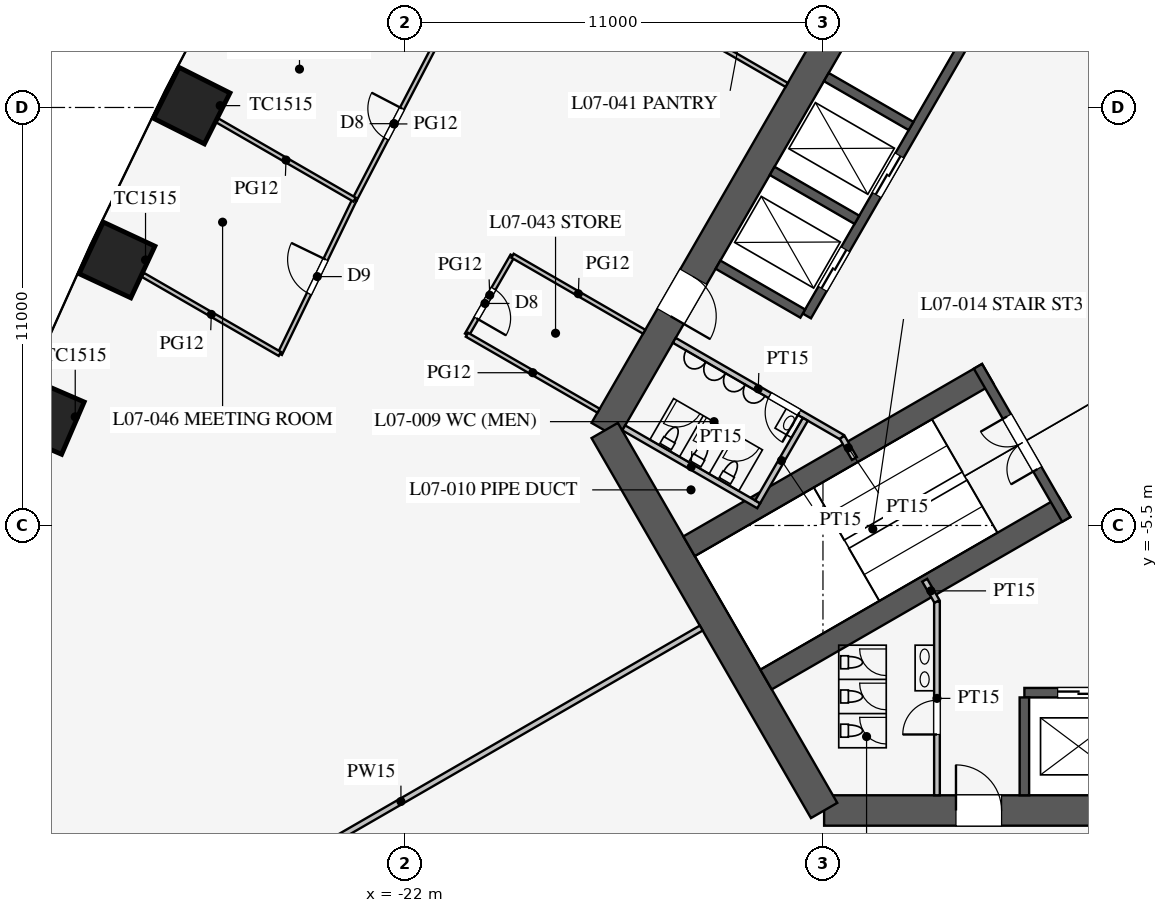
"""IFC4 building model, lengths in metres.
Left out: names, types, materials, properties, quantities, classifications, styles, units other than length and angle.
Written with IfcOpenShell. Run it as: python <this file> out.ifc"""

import sys

from ifc_helpers import new_model, si_unit, direction, frame, frame_2d, origin, origin_2d, place, context, subcontext, project, spatial, rectangle, extrude, element, fill, save


model = new_model("IFC4")
c1 = context("Model", 3, precision=1e-05, world=origin(), true_north=direction((0.0, 1.0)))
c2 = subcontext(c1, "Body", "Model", "MODEL_VIEW")
j1 = project(units=[si_unit("LENGTHUNIT", "METRE"), si_unit("PLANEANGLEUNIT", "RADIAN")], contexts=[c1])
p1 = place(None, origin())
s1 = spatial("IfcSite", under=j1, at=p1, CompositionType="ELEMENT")
p2 = place(p1, origin())
s2 = spatial("IfcBuilding", under=s1, at=p2, CompositionType="ELEMENT")
p3 = place(p2, frame((0.0, 0.0, 33.3)))
s3 = spatial("IfcBuildingStorey", under=s2, at=p3, CompositionType="ELEMENT", Elevation=33.3)
for number, where, z_axis, x_axis in (
    (1, (-27.611, 5.549, 0.0), (0.0, 0.0, 1.0), (-0.449, -0.894, 0.0)),
    (2, (-29.576, 1.487, 0.0), (0.0, 0.0, 1.0), (-0.423, -0.906, 0.0)),
    (3, (-31.426, -2.641, 0.0), (0.0, 0.0, 1.0), (-0.396, -0.918, 0.0)),
):
    element("IfcColumn", number, at=place(p3, frame(where, z_axis=z_axis, x_axis=x_axis)), inside=s3, PredefinedType="COLUMN", context=c2, shape_type="SweptSolid", body=[
        extrude(rectangle(XDim=1.5, YDim=1.5, at=origin_2d()), origin(), (0.0, 0.0, 1.0), 4.2),
    ])
p4 = place(p3, frame((-10.97, -13.0, 0.0), z_axis=(0.0, 0.0, 1.0), x_axis=(1.0, 0.0, 0.0)))
e4 = element("IfcWall", 4, at=p4, inside=s3, PredefinedType="SHEAR", context=c2, shape_type="SweptSolid", body=[
    extrude(rectangle(XDim=21.939, YDim=0.8, at=frame_2d((10.97, 0.0))), origin(), (0.0, 0.0, 1.0), 4.2),
])
p5 = place(p4, frame((17.27, 0.0, 0.0)))
e5 = element("IfcOpeningElement", 5, at=p5, cuts=e4, PredefinedType="OPENING", context=c2, shape_type="SweptSolid", body=[
    extrude(rectangle(XDim=1.2, YDim=2.1, at=frame_2d((0.6, 1.05))), frame((0.0, 0.41, 0.0), z_axis=(0.0, -1.0, 0.0), x_axis=(1.0, 0.0, 0.0)), (0.0, 0.0, 1.0), 0.82),
])
p6 = place(p4, frame((3.47, 0.0, 0.0)))
e6 = element("IfcOpeningElement", 6, at=p6, cuts=e4, PredefinedType="OPENING", context=c2, shape_type="SweptSolid", body=[
    extrude(rectangle(XDim=1.2, YDim=2.1, at=frame_2d((0.6, 1.05))), frame((0.0, 0.41, 0.0), z_axis=(0.0, -1.0, 0.0), x_axis=(1.0, 0.0, 0.0)), (0.0, 0.0, 1.0), 0.82),
])
p7 = place(p3, frame((-5.773, 16.0, 0.0), z_axis=(0.0, 0.0, 1.0), x_axis=(-0.500002442456, -0.866023993627, 0.0)))
e7 = element("IfcWall", 7, at=p7, inside=s3, PredefinedType="SHEAR", context=c2, shape_type="SweptSolid", body=[
    extrude(rectangle(XDim=21.939, YDim=0.8, at=frame_2d((10.97, 0.0))), origin(), (0.0, 0.0, 1.0), 4.2),
])
p8 = place(p7, frame((17.27, 0.0, 0.0)))
e8 = element("IfcOpeningElement", 8, at=p8, cuts=e7, PredefinedType="OPENING", context=c2, shape_type="SweptSolid", body=[
    extrude(rectangle(XDim=1.2, YDim=2.1, at=frame_2d((0.6, 1.05))), frame((0.0, 0.41, 0.0), z_axis=(0.0, -1.0, 0.0), x_axis=(1.0, 0.0, 0.0)), (0.0, 0.0, 1.0), 0.82),
])
p9 = place(p7, frame((3.47, 0.0, 0.0)))
e9 = element("IfcOpeningElement", 9, at=p9, cuts=e7, PredefinedType="OPENING", context=c2, shape_type="SweptSolid", body=[
    extrude(rectangle(XDim=1.2, YDim=2.1, at=frame_2d((0.6, 1.05))), frame((0.0, 0.41, 0.0), z_axis=(0.0, -1.0, 0.0), x_axis=(1.0, 0.0, 0.0)), (0.0, 0.0, 1.0), 0.82),
])
p10 = place(p3, frame((-16.743, -3.0, 0.0), z_axis=(0.0, 0.0, 1.0), x_axis=(0.499995765644, -0.866027848477, 0.0)))
e10 = element("IfcWall", 10, at=p10, inside=s3, PredefinedType="SHEAR", context=c2, shape_type="SweptSolid", body=[
    extrude(rectangle(XDim=11.547, YDim=0.8, at=frame_2d((5.773, 0.0))), origin(), (0.0, 0.0, 1.0), 4.2),
])
p11 = place(p3, frame((-5.7, -9.9, 0.0), z_axis=(0.0, 0.0, 1.0), x_axis=(1.0, 0.0, 0.0)))
e11 = element("IfcWall", 11, at=p11, inside=s3, PredefinedType="SHEAR", context=c2, shape_type="SweptSolid", body=[
    extrude(rectangle(XDim=11.4, YDim=0.25, at=frame_2d((5.7, 0.0))), origin(), (0.0, 0.0, 1.0), 4.2),
])
p12 = place(p11, frame((0.875, 0.0, 0.0)))
e12 = element("IfcOpeningElement", 12, at=p12, cuts=e11, PredefinedType="OPENING", context=c2, shape_type="SweptSolid", body=[
    extrude(rectangle(XDim=1.1, YDim=2.2, at=frame_2d((0.55, 1.1))), frame((0.0, 0.135, 0.0), z_axis=(0.0, -1.0, 0.0), x_axis=(1.0, 0.0, 0.0)), (0.0, 0.0, 1.0), 0.27),
])
p13 = place(p11, frame((3.725, 0.0, 0.0)))
e13 = element("IfcOpeningElement", 13, at=p13, cuts=e11, PredefinedType="OPENING", context=c2, shape_type="SweptSolid", body=[
    extrude(rectangle(XDim=1.1, YDim=2.2, at=frame_2d((0.55, 1.1))), frame((0.0, 0.135, 0.0), z_axis=(0.0, -1.0, 0.0), x_axis=(1.0, 0.0, 0.0)), (0.0, 0.0, 1.0), 0.27),
])
p14 = place(p11, frame((6.575, 0.0, 0.0)))
e14 = element("IfcOpeningElement", 14, at=p14, cuts=e11, PredefinedType="OPENING", context=c2, shape_type="SweptSolid", body=[
    extrude(rectangle(XDim=1.1, YDim=2.2, at=frame_2d((0.55, 1.1))), frame((0.0, 0.135, 0.0), z_axis=(0.0, -1.0, 0.0), x_axis=(1.0, 0.0, 0.0)), (0.0, 0.0, 1.0), 0.27),
])
p15 = place(p11, frame((9.425, 0.0, 0.0)))
e15 = element("IfcOpeningElement", 15, at=p15, cuts=e11, PredefinedType="OPENING", context=c2, shape_type="SweptSolid", body=[
    extrude(rectangle(XDim=1.1, YDim=2.2, at=frame_2d((0.55, 1.1))), frame((0.0, 0.135, 0.0), z_axis=(0.0, -1.0, 0.0), x_axis=(1.0, 0.0, 0.0)), (0.0, 0.0, 1.0), 0.27),
])
p16 = place(p3, frame((-5.7, -10.025, 0.0), z_axis=(0.0, 0.0, 1.0), x_axis=(0.0, -1.0, 0.0)))
e16 = element("IfcWall", 16, at=p16, inside=s3, PredefinedType="SHEAR", context=c2, shape_type="SweptSolid", body=[
    extrude(rectangle(XDim=2.575, YDim=0.25, at=frame_2d((1.288, 0.0))), origin(), (0.0, 0.0, 1.0), 4.2),
])
p17 = place(p3, frame((-5.724, 9.886, 0.0), z_axis=(0.0, 0.0, 1.0), x_axis=(-0.500001763848, -0.866024385424, 0.0)))
e17 = element("IfcWall", 17, at=p17, inside=s3, PredefinedType="SHEAR", context=c2, shape_type="SweptSolid", body=[
    extrude(rectangle(XDim=11.4, YDim=0.25, at=frame_2d((5.7, 0.0))), origin(), (0.0, 0.0, 1.0), 4.2),
])
p18 = place(p17, frame((6.525, 0.0, 0.0)))
e18 = element("IfcOpeningElement", 18, at=p18, cuts=e17, PredefinedType="OPENING", context=c2, shape_type="SweptSolid", body=[
    extrude(rectangle(XDim=1.2, YDim=2.2, at=frame_2d((0.6, 1.1))), frame((0.0, 0.135, 0.0), z_axis=(0.0, -1.0, 0.0), x_axis=(1.0, 0.0, 0.0)), (0.0, 0.0, 1.0), 0.27),
])
p19 = place(p17, frame((9.375, 0.0, 0.0)))
e19 = element("IfcOpeningElement", 19, at=p19, cuts=e17, PredefinedType="OPENING", context=c2, shape_type="SweptSolid", body=[
    extrude(rectangle(XDim=1.2, YDim=2.2, at=frame_2d((0.6, 1.1))), frame((0.0, 0.135, 0.0), z_axis=(0.0, -1.0, 0.0), x_axis=(1.0, 0.0, 0.0)), (0.0, 0.0, 1.0), 0.27),
])
for number, where, z_axis, x_axis in (
    (20, (-8.682, 5.012, 0.0), (0.0, 0.0, 1.0), (-0.866, 0.5, 0.0)),
    (21, (-10.107, 2.544, 0.0), (0.0, 0.0, 1.0), (-0.866, 0.5, 0.0)),
    (22, (-11.532, 0.076, 0.0), (0.0, 0.0, 1.0), (-0.866, 0.5, 0.0)),
):
    element("IfcWall", number, at=place(p3, frame(where, z_axis=z_axis, x_axis=x_axis)), inside=s3, PredefinedType="SHEAR", context=c2, shape_type="SweptSolid", body=[
        extrude(rectangle(XDim=2.575, YDim=0.25, at=frame_2d((1.288, 0.0))), origin(), (0.0, 0.0, 1.0), 4.2),
    ])
for number, where, z_axis, x_axis in (
    (23, (-6.663, -1.509, 0.0), (0.0, 0.0, 1.0), (-0.866, -0.5, 0.0)),
    (24, (-4.638, -5.016, 0.0), (0.0, 0.0, 1.0), (-0.866, -0.5, 0.0)),
):
    element("IfcWall", number, at=place(p3, frame(where, z_axis=z_axis, x_axis=x_axis)), inside=s3, PredefinedType="SHEAR", context=c2, shape_type="SweptSolid", body=[
        extrude(rectangle(XDim=9.075, YDim=0.6, at=frame_2d((4.538, 0.0))), origin(), (0.0, 0.0, 1.0), 4.2),
    ])
p20 = place(p3, frame((-6.922, -1.312, 0.0), z_axis=(0.0, 0.0, 1.0), x_axis=(0.499984536904, -0.866034331223, 0.0)))
e25 = element("IfcWall", 25, at=p20, inside=s3, PredefinedType="SHEAR", context=c2, shape_type="SweptSolid", body=[
    extrude(rectangle(XDim=4.65, YDim=0.25, at=frame_2d((2.325, 0.0))), origin(), (0.0, 0.0, 1.0), 4.2),
])
p21 = place(p20, frame((1.525, 0.0, 0.0)))
e26 = element("IfcOpeningElement", 26, at=p21, cuts=e25, PredefinedType="OPENING", context=c2, shape_type="SweptSolid", body=[
    extrude(rectangle(XDim=1.6, YDim=2.1, at=frame_2d((0.8, 1.05))), frame((0.0, 0.135, 0.0), z_axis=(0.0, -1.0, 0.0), x_axis=(1.0, 0.0, 0.0)), (0.0, 0.0, 1.0), 0.27),
])
p22 = place(p3, frame((-8.0, -7.5, 0.0), z_axis=(0.0, 0.0, 1.0), x_axis=(0.0, -1.0, 0.0)))
e27 = element("IfcWall", 27, at=p22, inside=s3, PredefinedType="PARTITIONING", context=c2, shape_type="SweptSolid", body=[
    extrude(rectangle(XDim=5.1, YDim=0.15, at=frame_2d((2.55, 0.0))), origin(), (0.0, 0.0, 1.0), 4.0),
])
p23 = place(p22, frame((2.6, 0.0, 0.0)))
e28 = element("IfcOpeningElement", 28, at=p23, cuts=e27, PredefinedType="OPENING", context=c2, shape_type="SweptSolid", body=[
    extrude(rectangle(XDim=0.9, YDim=2.1, at=frame_2d((0.45, 1.05))), frame((0.0, 0.085, 0.0), z_axis=(0.0, -1.0, 0.0), x_axis=(1.0, 0.0, 0.0)), (0.0, 0.0, 1.0), 0.17),
])
p24 = place(p3, frame((-10.495, -3.178, 0.0), z_axis=(0.0, 0.0, 1.0), x_axis=(-0.86602216432, 0.500005610874, 0.0)))
e29 = element("IfcWall", 29, at=p24, inside=s3, PredefinedType="PARTITIONING", context=c2, shape_type="SweptSolid", body=[
    extrude(rectangle(XDim=5.1, YDim=0.15, at=frame_2d((2.55, 0.0))), origin(), (0.0, 0.0, 1.0), 4.0),
])
p25 = place(p24, frame((1.3, 0.0, 0.0)))
e30 = element("IfcOpeningElement", 30, at=p25, cuts=e29, PredefinedType="OPENING", context=c2, shape_type="SweptSolid", body=[
    extrude(rectangle(XDim=0.9, YDim=2.1, at=frame_2d((0.45, 1.05))), frame((0.0, 0.085, 0.0), z_axis=(0.0, -1.0, 0.0), x_axis=(1.0, 0.0, 0.0)), (0.0, 0.0, 1.0), 0.17),
])
for number, where, z_axis, x_axis in (
    (31, (-10.495, -3.178, 0.0), (0.0, 0.0, 1.0), (0.5, -0.866, 0.0)),
    (32, (-8.0, -7.5, 0.0), (0.0, 0.0, 1.0), (-0.5, 0.866, 0.0)),
):
    element("IfcWall", number, at=place(p3, frame(where, z_axis=z_axis, x_axis=x_axis)), inside=s3, PredefinedType="PARTITIONING", context=c2, shape_type="SweptSolid", body=[
        extrude(rectangle(XDim=0.645, YDim=0.15, at=frame_2d((0.323, 0.0))), origin(), (0.0, 0.0, 1.0), 4.0),
    ])
p26 = place(p3, frame((-12.691, -4.982, 0.0), z_axis=(0.0, 0.0, 1.0), x_axis=(-0.8660249478, 0.500000789788, 0.0)))
e33 = element("IfcWall", 33, at=p26, inside=s3, PredefinedType="PARTITIONING", context=c2, shape_type="SweptSolid", body=[
    extrude(rectangle(XDim=4.1, YDim=0.15, at=frame_2d((2.05, 0.0))), origin(), (0.0, 0.0, 1.0), 4.0),
])
p27 = place(p3, frame((-11.464, -2.706, 0.0), z_axis=(0.0, 0.0, 1.0), x_axis=(-0.50001992892, -0.866013897511, 0.0)))
e34 = element("IfcWall", 34, at=p27, inside=s3, PredefinedType="PARTITIONING", context=c2, shape_type="SweptSolid", body=[
    extrude(rectangle(XDim=2.51, YDim=0.15, at=frame_2d((1.255, 0.0))), origin(), (0.0, 0.0, 1.0), 4.0),
])
p28 = place(p3, frame((-14.203, -8.2, 0.0), z_axis=(0.0, 0.0, 1.0), x_axis=(-0.866024965723, -0.500000758745, 0.0)))
e35 = element("IfcWall", 35, at=p28, inside=s3, PredefinedType="PARTITIONING", context=c2, shape_type="SweptSolid", body=[
    extrude(rectangle(XDim=18.25, YDim=0.15, at=frame_2d((9.125, 0.0))), origin(), (0.0, 0.0, 1.0), 2.3),
])
p29 = place(p3, frame((-19.169, 1.599, 0.0), z_axis=(0.0, 0.0, 1.0), x_axis=(-0.499957262057, -0.866050077142, 0.0)))
e36 = element("IfcWall", 36, at=p29, inside=s3, PredefinedType="PARTITIONING", context=c2, shape_type="SweptSolid", body=[
    extrude(rectangle(XDim=2.4, YDim=0.12, at=frame_2d((1.2, 0.0))), origin(), (0.0, 0.0, 1.0), 2.9),
])
p30 = place(p29, frame((1.0, 0.0, 0.15)))
e37 = element("IfcOpeningElement", 37, at=p30, cuts=e36, PredefinedType="OPENING", context=c2, shape_type="SweptSolid", body=[
    extrude(rectangle(XDim=0.9, YDim=2.1, at=frame_2d((0.45, 1.05))), frame((0.0, 0.07, 0.0), z_axis=(0.0, -1.0, 0.0), x_axis=(1.0, 0.0, 0.0)), (0.0, 0.0, 1.0), 0.14),
])
for number, where, z_axis, x_axis in (
    (38, (-11.955, 6.094, 0.0), (0.0, 0.0, 1.0), (-0.866, 0.5, 0.0)),
    (39, (-16.905, -2.48, 0.0), (0.0, 0.0, 1.0), (-0.866, 0.5, 0.0)),
    (40, (-15.705, -0.401, 0.0), (0.0, 0.0, 1.0), (-0.866, 0.5, 0.0)),
):
    element("IfcWall", number, at=place(p3, frame(where, z_axis=z_axis, x_axis=x_axis)), inside=s3, PredefinedType="PARTITIONING", context=c2, shape_type="SweptSolid", body=[
        extrude(rectangle(XDim=4.0, YDim=0.12, at=frame_2d((2.0, 0.0))), origin(), (0.0, 0.0, 1.0), 2.9),
    ])
p31 = place(p3, frame((-21.245, 7.07, 0.0), z_axis=(0.0, 0.0, 1.0), x_axis=(-0.461852697957, -0.886956642339, 0.0)))
e41 = element("IfcWall", 41, at=p31, inside=s3, PredefinedType="PARTITIONING", context=c2, shape_type="SweptSolid", body=[
    extrude(rectangle(XDim=4.504, YDim=0.12, at=frame_2d((2.252, 0.0))), origin(), (0.0, 0.0, 1.0), 2.9),
])
p32 = place(p31, frame((1.8, 0.0, 0.15)))
e42 = element("IfcOpeningElement", 42, at=p32, cuts=e41, PredefinedType="OPENING", context=c2, shape_type="SweptSolid", body=[
    extrude(rectangle(XDim=0.9, YDim=2.1, at=frame_2d((0.45, 1.05))), frame((0.0, 0.07, 0.0), z_axis=(0.0, -1.0, 0.0), x_axis=(1.0, 0.0, 0.0)), (0.0, 0.0, 1.0), 0.14),
])
p33 = place(p3, frame((-23.325, 3.074, 0.0), z_axis=(0.0, 0.0, 1.0), x_axis=(-0.435857917556, -0.900015486369, 0.0)))
e43 = element("IfcWall", 43, at=p33, inside=s3, PredefinedType="PARTITIONING", context=c2, shape_type="SweptSolid", body=[
    extrude(rectangle(XDim=4.512, YDim=0.12, at=frame_2d((2.256, 0.0))), origin(), (0.0, 0.0, 1.0), 2.9),
])
p34 = place(p33, frame((1.75, 0.0, 0.15)))
e44 = element("IfcOpeningElement", 44, at=p34, cuts=e43, PredefinedType="OPENING", context=c2, shape_type="SweptSolid", body=[
    extrude(rectangle(XDim=1.0, YDim=2.1, at=frame_2d((0.5, 1.05))), frame((0.0, 0.07, 0.0), z_axis=(0.0, -1.0, 0.0), x_axis=(1.0, 0.0, 0.0)), (0.0, 0.0, 1.0), 0.14),
])
p35 = place(p3, frame((-25.292, -0.986, 0.0), z_axis=(0.0, 0.0, 1.0), x_axis=(-0.866011781705, 0.500023593391, 0.0)))
e45 = element("IfcWall", 45, at=p35, inside=s3, PredefinedType="PARTITIONING", context=c2, shape_type="SweptSolid", body=[
    extrude(rectangle(XDim=4.164, YDim=0.12, at=frame_2d((2.082, 0.0))), origin(), (0.0, 0.0, 1.0), 2.9),
])
p36 = place(p3, frame((-23.325, 3.074, 0.0), z_axis=(0.0, 0.0, 1.0), x_axis=(-0.866009971343, 0.50002672882, 0.0)))
e46 = element("IfcWall", 46, at=p36, inside=s3, PredefinedType="PARTITIONING", context=c2, shape_type="SweptSolid", body=[
    extrude(rectangle(XDim=4.167, YDim=0.12, at=frame_2d((2.083, 0.0))), origin(), (0.0, 0.0, 1.0), 2.9),
])
p37 = place(p23, frame((0.9, 0.0, 0.0), z_axis=(0.0, 0.0, 1.0), x_axis=(-1.0, 0.0, 0.0)))
e47 = element("IfcDoor", 47, at=p37, inside=s3, OperationType="SINGLE_SWING_LEFT", PredefinedType="DOOR", context=c2, shape_type="SweptSolid", body=[
    extrude(rectangle(XDim=0.9, YDim=2.1, at=frame_2d((0.45, 1.05))), frame((0.0, 0.025, 0.0), z_axis=(0.0, -1.0, 0.0), x_axis=(1.0, 0.0, 0.0)), (0.0, 0.0, 1.0), 0.05),
])
fill(e28, e47)
p38 = place(p25, origin())
e48 = element("IfcDoor", 48, at=p38, inside=s3, OperationType="SINGLE_SWING_LEFT", PredefinedType="DOOR", context=c2, shape_type="SweptSolid", body=[
    extrude(rectangle(XDim=0.9, YDim=2.1, at=frame_2d((0.45, 1.05))), frame((0.0, 0.025, 0.0), z_axis=(0.0, -1.0, 0.0), x_axis=(1.0, 0.0, 0.0)), (0.0, 0.0, 1.0), 0.05),
])
fill(e30, e48)
p39 = place(p21, frame((1.6, 0.0, 0.0), z_axis=(0.0, 0.0, 1.0), x_axis=(-1.0, 0.0, 0.0)))
e49 = element("IfcDoor", 49, at=p39, inside=s3, OperationType="DOUBLE_DOOR_SINGLE_SWING", PredefinedType="DOOR", context=c2, shape_type="SweptSolid", body=[
    extrude(rectangle(XDim=1.6, YDim=2.1, at=frame_2d((0.8, 1.05))), frame((0.0, 0.025, 0.0), z_axis=(0.0, -1.0, 0.0), x_axis=(1.0, 0.0, 0.0)), (0.0, 0.0, 1.0), 0.05),
])
fill(e26, e49)
p40 = place(p6, origin())
e50 = element("IfcDoor", 50, at=p40, inside=s3, OperationType="SINGLE_SWING_LEFT", PredefinedType="DOOR", context=c2, shape_type="SweptSolid", body=[
    extrude(rectangle(XDim=1.2, YDim=2.1, at=frame_2d((0.6, 1.05))), frame((0.0, 0.025, 0.0), z_axis=(0.0, -1.0, 0.0), x_axis=(1.0, 0.0, 0.0)), (0.0, 0.0, 1.0), 0.05),
])
fill(e6, e50)
p41 = place(p8, origin())
e51 = element("IfcDoor", 51, at=p41, inside=s3, OperationType="SINGLE_SWING_RIGHT", PredefinedType="DOOR", context=c2, shape_type="SweptSolid", body=[
    extrude(rectangle(XDim=1.2, YDim=2.1, at=frame_2d((0.6, 1.05))), frame((0.0, 0.025, 0.0), z_axis=(0.0, -1.0, 0.0), x_axis=(1.0, 0.0, 0.0)), (0.0, 0.0, 1.0), 0.05),
])
fill(e8, e51)
p42 = place(p30, origin())
e52 = element("IfcDoor", 52, at=p42, inside=s3, OperationType="SINGLE_SWING_RIGHT", PredefinedType="DOOR", context=c2, shape_type="SweptSolid", body=[
    extrude(rectangle(XDim=0.9, YDim=2.1, at=frame_2d((0.45, 1.05))), frame((0.0, 0.025, 0.0), z_axis=(0.0, -1.0, 0.0), x_axis=(1.0, 0.0, 0.0)), (0.0, 0.0, 1.0), 0.05),
])
fill(e37, e52)
p43 = place(p32, frame((0.9, 0.0, 0.0), z_axis=(0.0, 0.0, 1.0), x_axis=(-1.0, 0.0, 0.0)))
e53 = element("IfcDoor", 53, at=p43, inside=s3, OperationType="SINGLE_SWING_RIGHT", PredefinedType="DOOR", context=c2, shape_type="SweptSolid", body=[
    extrude(rectangle(XDim=0.9, YDim=2.1, at=frame_2d((0.45, 1.05))), frame((0.0, 0.025, 0.0), z_axis=(0.0, -1.0, 0.0), x_axis=(1.0, 0.0, 0.0)), (0.0, 0.0, 1.0), 0.05),
])
fill(e42, e53)
p44 = place(p34, frame((1.0, 0.0, 0.0), z_axis=(0.0, 0.0, 1.0), x_axis=(-1.0, 0.0, 0.0)))
e54 = element("IfcDoor", 54, at=p44, inside=s3, OperationType="SINGLE_SWING_RIGHT", PredefinedType="DOOR", context=c2, shape_type="SweptSolid", body=[
    extrude(rectangle(XDim=1.0, YDim=2.1, at=frame_2d((0.5, 1.05))), frame((0.0, 0.025, 0.0), z_axis=(0.0, -1.0, 0.0), x_axis=(1.0, 0.0, 0.0)), (0.0, 0.0, 1.0), 0.05),
])
fill(e44, e54)
p45 = place(p12, origin())
e55 = element("IfcDoor", 55, at=p45, inside=s3, OperationType="DOUBLE_DOOR_SLIDING", PredefinedType="DOOR", context=c2, shape_type="SweptSolid", body=[
    extrude(rectangle(XDim=1.1, YDim=2.2, at=frame_2d((0.55, 1.1))), frame((0.0, 0.025, 0.0), z_axis=(0.0, -1.0, 0.0), x_axis=(1.0, 0.0, 0.0)), (0.0, 0.0, 1.0), 0.05),
])
fill(e12, e55)
p46 = place(p18, origin())
e56 = element("IfcDoor", 56, at=p46, inside=s3, OperationType="DOUBLE_DOOR_SLIDING", PredefinedType="DOOR", context=c2, shape_type="SweptSolid", body=[
    extrude(rectangle(XDim=1.2, YDim=2.2, at=frame_2d((0.6, 1.1))), frame((0.0, 0.025, 0.0), z_axis=(0.0, -1.0, 0.0), x_axis=(1.0, 0.0, 0.0)), (0.0, 0.0, 1.0), 0.05),
])
fill(e18, e56)
p47 = place(p19, origin())
e57 = element("IfcDoor", 57, at=p47, inside=s3, OperationType="DOUBLE_DOOR_SLIDING", PredefinedType="DOOR", context=c2, shape_type="SweptSolid", body=[
    extrude(rectangle(XDim=1.2, YDim=2.2, at=frame_2d((0.6, 1.1))), frame((0.0, 0.025, 0.0), z_axis=(0.0, -1.0, 0.0), x_axis=(1.0, 0.0, 0.0)), (0.0, 0.0, 1.0), 0.05),
])
fill(e19, e57)
save(model, sys.argv[1])
